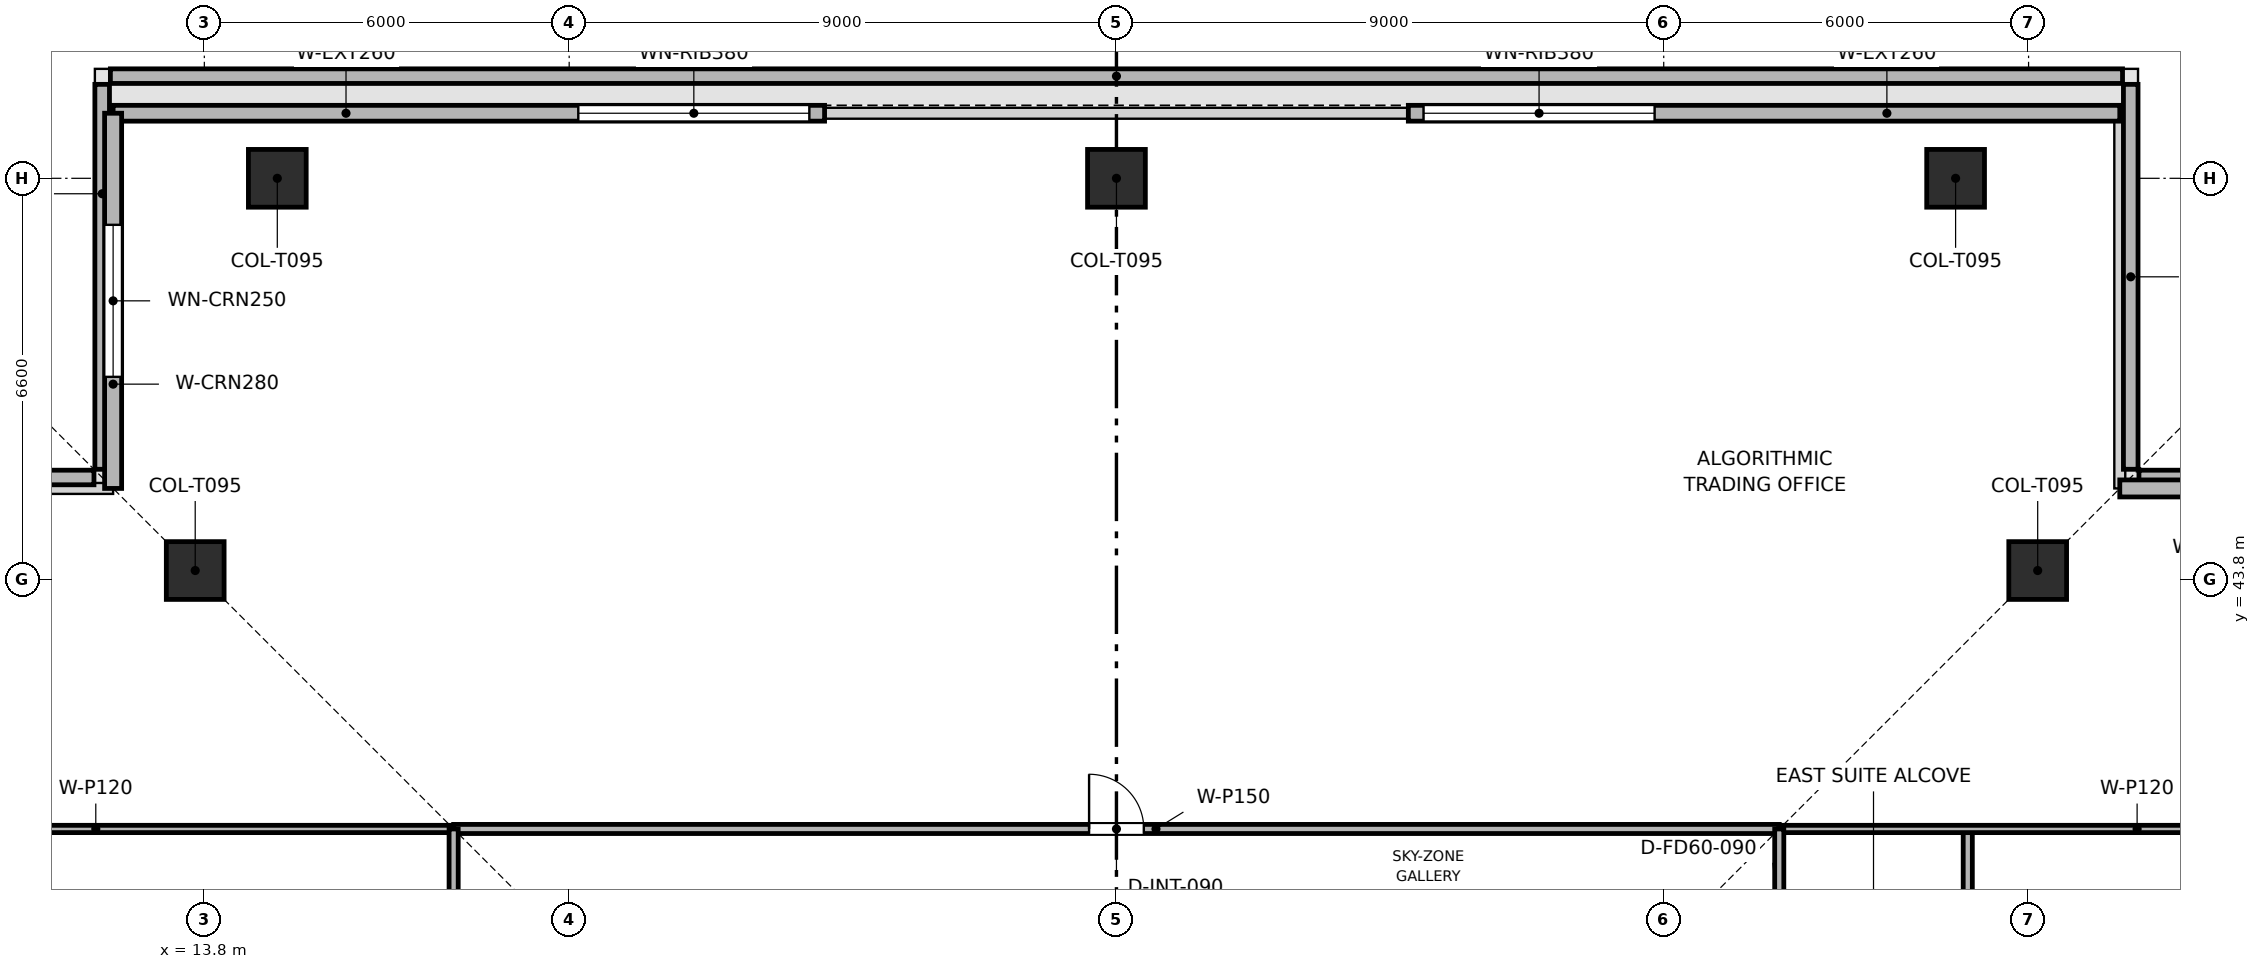
"""IFC4 building model, lengths in metres.
Left out: names, types, materials, properties, quantities, classifications, styles, units other than length and angle.
Written with IfcOpenShell. Run it as: python <this file> out.ifc"""

import sys

from ifc_helpers import new_model, si_unit, direction, frame, frame_2d, origin, origin_2d, place, context, subcontext, project, spatial, rectangle, extrude, element, fill, save


model = new_model("IFC4")
c1 = context("Model", 3, precision=1e-05, world=origin(), true_north=direction((0.0, 1.0)))
c2 = subcontext(c1, "Body", "Model", "MODEL_VIEW")
j1 = project(units=[si_unit("LENGTHUNIT", "METRE"), si_unit("PLANEANGLEUNIT", "RADIAN")], contexts=[c1])
p1 = place(None, origin())
s1 = spatial("IfcSite", under=j1, at=p1, CompositionType="ELEMENT")
p2 = place(p1, origin())
s2 = spatial("IfcBuilding", under=s1, at=p2, CompositionType="ELEMENT")
p3 = place(p2, frame((0.0, 0.0, 295.5)))
s3 = spatial("IfcBuildingStorey", under=s2, at=p3, CompositionType="ELEMENT", Elevation=295.5)
for number, where, z_axis, x_axis in (
    (1, (42.6, 50.4, 0.003), (0.0, 0.0, 1.0), (1.0, 0.0, 0.0)),
    (2, (28.8, 50.4, 0.003), (0.0, 0.0, 1.0), (1.0, 0.0, 0.0)),
    (3, (15.0, 50.4, 0.003), (0.0, 0.0, 1.0), (1.0, 0.0, 0.0)),
    (4, (43.95, 43.95, 0.003), (0.0, 0.0, 1.0), (1.0, 0.0, 0.0)),
    (5, (13.65, 43.95, 0.003), (0.0, 0.0, 1.0), (1.0, 0.0, 0.0)),
):
    element("IfcColumn", number, at=place(p3, frame(where, z_axis=z_axis, x_axis=x_axis)), inside=s3, PredefinedType="COLUMN", context=c2, shape_type="SweptSolid", body=[
        extrude(rectangle(XDim=0.95, YDim=0.95, at=origin_2d()), origin(), (0.0, 0.0, 1.0), 3.504),
    ])
for number, where, z_axis, x_axis in (
    (6, (51.945, 45.48, 0.0), (0.0, 0.0, 1.0), (-1.0, 0.0, 0.0)),
    (7, (45.48, 45.615, 0.0), (0.0, 0.0, 1.0), (0.0, 1.0, 0.0)),
):
    element("IfcWall", number, at=place(p3, frame(where, z_axis=z_axis, x_axis=x_axis)), inside=s3, PredefinedType="PARAPET", context=c2, shape_type="SweptSolid", body=[
        extrude(rectangle(XDim=6.33, YDim=0.24, at=frame_2d((3.165, 0.0))), origin(), (0.0, 0.0, 1.0), 1.2),
    ])
p4 = place(p3, frame((45.345, 52.08, 0.0), z_axis=(0.0, 0.0, 1.0), x_axis=(-1.0, 0.0, 0.0)))
e8 = element("IfcWall", 8, at=p4, inside=s3, PredefinedType="PARAPET", context=c2, shape_type="SweptSolid", body=[
    extrude(rectangle(XDim=33.09, YDim=0.24, at=frame_2d((16.545, 0.0))), origin(), (0.0, 0.0, 1.0), 1.2),
])
for number, where, z_axis, x_axis in (
    (9, (12.12, 51.945, 0.0), (0.0, 0.0, 1.0), (0.0, -1.0, 0.0)),
    (10, (11.985, 45.48, 0.0), (0.0, 0.0, 1.0), (-1.0, 0.0, 0.0)),
):
    element("IfcWall", number, at=place(p3, frame(where, z_axis=z_axis, x_axis=x_axis)), inside=s3, PredefinedType="PARAPET", context=c2, shape_type="SweptSolid", body=[
        extrude(rectangle(XDim=6.33, YDim=0.24, at=frame_2d((3.165, 0.0))), origin(), (0.0, 0.0, 1.0), 1.2),
    ])
p5 = place(p3, frame((12.3, 51.47, 0.0), z_axis=(0.0, 0.0, 1.0), x_axis=(1.0, 0.0, 0.0)))
e11 = element("IfcWall", 11, at=p5, inside=s3, PredefinedType="SOLIDWALL", context=c2, shape_type="SweptSolid", body=[
    extrude(rectangle(XDim=11.7, YDim=0.26, at=frame_2d((5.85, 0.0))), origin(), (0.0, 0.0, 1.0), 3.51),
])
p6 = place(p5, frame((7.65, 0.0, 0.9)))
e12 = element("IfcOpeningElement", 12, at=p6, cuts=e11, PredefinedType="OPENING", context=c2, shape_type="SweptSolid", body=[
    extrude(rectangle(XDim=3.8, YDim=1.9, at=frame_2d((1.9, 0.95))), frame((0.0, 0.14, 0.0), z_axis=(0.0, -1.0, 0.0), x_axis=(1.0, 0.0, 0.0)), (0.0, 0.0, 1.0), 0.28),
])
p7 = place(p3, frame((33.6, 51.47, 0.0), z_axis=(0.0, 0.0, 1.0), x_axis=(1.0, 0.0, 0.0)))
e13 = element("IfcWall", 13, at=p7, inside=s3, PredefinedType="SOLIDWALL", context=c2, shape_type="SweptSolid", body=[
    extrude(rectangle(XDim=11.7, YDim=0.26, at=frame_2d((5.85, 0.0))), origin(), (0.0, 0.0, 1.0), 3.51),
])
p8 = place(p7, frame((0.25, 0.0, 0.9)))
e14 = element("IfcOpeningElement", 14, at=p8, cuts=e13, PredefinedType="OPENING", context=c2, shape_type="SweptSolid", body=[
    extrude(rectangle(XDim=3.8, YDim=1.9, at=frame_2d((1.9, 0.95))), frame((0.0, 0.14, 0.0), z_axis=(0.0, -1.0, 0.0), x_axis=(1.0, 0.0, 0.0)), (0.0, 0.0, 1.0), 0.28),
])
p9 = place(p3, frame((12.3, 45.3, 0.0), z_axis=(0.0, 0.0, 1.0), x_axis=(0.0, 1.0, 0.0)))
e15 = element("IfcWall", 15, at=p9, inside=s3, PredefinedType="SOLIDWALL", context=c2, shape_type="SweptSolid", body=[
    extrude(rectangle(XDim=6.17, YDim=0.28, at=frame_2d((3.085, 0.0))), origin(), (0.0, 0.0, 1.0), 3.51),
])
p10 = place(p9, frame((1.835, 0.0, 0.9)))
e16 = element("IfcOpeningElement", 16, at=p10, cuts=e15, PredefinedType="OPENING", context=c2, shape_type="SweptSolid", body=[
    extrude(rectangle(XDim=2.5, YDim=1.9, at=frame_2d((1.25, 0.95))), frame((0.0, 0.15, 0.0), z_axis=(0.0, -1.0, 0.0), x_axis=(1.0, 0.0, 0.0)), (0.0, 0.0, 1.0), 0.3),
])
p11 = place(p3, frame((45.3, 45.3, 0.0), z_axis=(0.0, 0.0, 1.0), x_axis=(1.0, 0.0, 0.0)))
e17 = element("IfcWall", 17, at=p11, inside=s3, PredefinedType="SOLIDWALL", context=c2, shape_type="SweptSolid", body=[
    extrude(rectangle(XDim=6.17, YDim=0.28, at=frame_2d((3.085, 0.0))), origin(), (0.0, 0.0, 1.0), 3.51),
])
p12 = place(p11, frame((1.835, 0.0, 0.9)))
e18 = element("IfcOpeningElement", 18, at=p12, cuts=e17, PredefinedType="OPENING", context=c2, shape_type="SweptSolid", body=[
    extrude(rectangle(XDim=2.5, YDim=1.9, at=frame_2d((1.25, 0.95))), frame((0.0, 0.15, 0.0), z_axis=(0.0, -1.0, 0.0), x_axis=(1.0, 0.0, 0.0)), (0.0, 0.0, 1.0), 0.3),
])
p13 = place(p3, frame((42.8, 28.0, 0.0), z_axis=(0.0, 0.0, 1.0), x_axis=(0.0, 1.0, 0.0)))
e19 = element("IfcWall", 19, at=p13, inside=s3, PredefinedType="PARTITIONING", context=c2, shape_type="SweptSolid", body=[
    extrude(rectangle(XDim=11.7, YDim=0.15, at=frame_2d((5.85, 0.0))), origin(), (0.0, 0.0, 1.0), 3.095),
])
p14 = place(p13, frame((9.6, 0.0, 0.0)))
e20 = element("IfcOpeningElement", 20, at=p14, cuts=e19, PredefinedType="OPENING", context=c2, shape_type="SweptSolid", body=[
    extrude(rectangle(XDim=0.9, YDim=2.1, at=frame_2d((0.45, 1.05))), frame((0.0, 0.085, 0.0), z_axis=(0.0, -1.0, 0.0), x_axis=(1.0, 0.0, 0.0)), (0.0, 0.0, 1.0), 0.17),
])
for number, where, z_axis, x_axis in (
    (21, (6.13, 39.7, 0.0), (0.0, 0.0, 1.0), (1.0, 0.0, 0.0)),
    (22, (39.7, 39.7, 0.0), (0.0, 0.0, 1.0), (1.0, 0.0, 0.0)),
):
    element("IfcWall", number, at=place(p3, frame(where, z_axis=z_axis, x_axis=x_axis)), inside=s3, PredefinedType="PARTITIONING", context=c2, shape_type="SweptSolid", body=[
        extrude(rectangle(XDim=11.77, YDim=0.12, at=frame_2d((5.885, 0.0))), origin(), (0.0, 0.0, 1.0), 3.095),
    ])
p15 = place(p3, frame((17.9, 39.7, 0.0), z_axis=(0.0, 0.0, 1.0), x_axis=(1.0, 0.0, 0.0)))
e23 = element("IfcWall", 23, at=p15, inside=s3, PredefinedType="PARTITIONING", context=c2, shape_type="SweptSolid", body=[
    extrude(rectangle(XDim=21.8, YDim=0.15, at=frame_2d((10.9, 0.0))), origin(), (0.0, 0.0, 1.0), 3.095),
])
p16 = place(p15, frame((10.45, 0.0, 0.0)))
e24 = element("IfcOpeningElement", 24, at=p16, cuts=e23, PredefinedType="OPENING", context=c2, shape_type="SweptSolid", body=[
    extrude(rectangle(XDim=0.9, YDim=2.1, at=frame_2d((0.45, 1.05))), frame((0.0, 0.085, 0.0), z_axis=(0.0, -1.0, 0.0), x_axis=(1.0, 0.0, 0.0)), (0.0, 0.0, 1.0), 0.17),
])
p17 = place(p3, frame((17.9, 12.3, 0.0), z_axis=(0.0, 0.0, 1.0), x_axis=(0.0, 1.0, 0.0)))
e25 = element("IfcWall", 25, at=p17, inside=s3, PredefinedType="PARTITIONING", context=c2, shape_type="SweptSolid", body=[
    extrude(rectangle(XDim=27.4, YDim=0.15, at=frame_2d((13.7, 0.0))), origin(), (0.0, 0.0, 1.0), 3.095),
])
p18 = place(p17, frame((1.498, 0.0, 0.0)))
e26 = element("IfcOpeningElement", 26, at=p18, cuts=e25, PredefinedType="OPENING", context=c2, shape_type="SweptSolid", body=[
    extrude(rectangle(XDim=0.9, YDim=2.1, at=frame_2d((0.45, 1.05))), frame((0.0, 0.085, 0.0), z_axis=(0.0, -1.0, 0.0), x_axis=(1.0, 0.0, 0.0)), (0.0, 0.0, 1.0), 0.17),
])
p19 = place(p17, frame((15.198, 0.0, 0.0)))
e27 = element("IfcOpeningElement", 27, at=p19, cuts=e25, PredefinedType="OPENING", context=c2, shape_type="SweptSolid", body=[
    extrude(rectangle(XDim=0.9, YDim=2.1, at=frame_2d((0.45, 1.05))), frame((0.0, 0.085, 0.0), z_axis=(0.0, -1.0, 0.0), x_axis=(1.0, 0.0, 0.0)), (0.0, 0.0, 1.0), 0.17),
])
p20 = place(p3, frame((39.7, 24.4, 0.0), z_axis=(0.0, 0.0, 1.0), x_axis=(0.0, 1.0, 0.0)))
e28 = element("IfcWall", 28, at=p20, inside=s3, PredefinedType="PARTITIONING", context=c2, shape_type="SweptSolid", body=[
    extrude(rectangle(XDim=15.3, YDim=0.15, at=frame_2d((7.65, 0.0))), origin(), (0.0, 0.0, 1.0), 3.095),
])
p21 = place(p20, frame((1.35, 0.0, 0.0)))
e29 = element("IfcOpeningElement", 29, at=p21, cuts=e28, PredefinedType="OPENING", context=c2, shape_type="SweptSolid", body=[
    extrude(rectangle(XDim=0.9, YDim=2.1, at=frame_2d((0.45, 1.05))), frame((0.0, 0.085, 0.0), z_axis=(0.0, -1.0, 0.0), x_axis=(1.0, 0.0, 0.0)), (0.0, 0.0, 1.0), 0.17),
])
p22 = place(p20, frame((4.55, 0.0, 0.0)))
e30 = element("IfcOpeningElement", 30, at=p22, cuts=e28, PredefinedType="OPENING", context=c2, shape_type="SweptSolid", body=[
    extrude(rectangle(XDim=0.9, YDim=2.1, at=frame_2d((0.45, 1.05))), frame((0.0, 0.085, 0.0), z_axis=(0.0, -1.0, 0.0), x_axis=(1.0, 0.0, 0.0)), (0.0, 0.0, 1.0), 0.17),
])
p23 = place(p20, frame((7.45, 0.0, 0.0)))
e31 = element("IfcOpeningElement", 31, at=p23, cuts=e28, PredefinedType="OPENING", context=c2, shape_type="SweptSolid", body=[
    extrude(rectangle(XDim=0.9, YDim=2.1, at=frame_2d((0.45, 1.05))), frame((0.0, 0.085, 0.0), z_axis=(0.0, -1.0, 0.0), x_axis=(1.0, 0.0, 0.0)), (0.0, 0.0, 1.0), 0.17),
])
p24 = place(p20, frame((10.2, 0.0, 0.0)))
e32 = element("IfcOpeningElement", 32, at=p24, cuts=e28, PredefinedType="OPENING", context=c2, shape_type="SweptSolid", body=[
    extrude(rectangle(XDim=0.95, YDim=2.1, at=frame_2d((0.475, 1.05))), frame((0.0, 0.085, 0.0), z_axis=(0.0, -1.0, 0.0), x_axis=(1.0, 0.0, 0.0)), (0.0, 0.0, 1.0), 0.17),
])
p25 = place(p20, frame((13.2, 0.0, 0.0)))
e33 = element("IfcOpeningElement", 33, at=p25, cuts=e28, PredefinedType="OPENING", context=c2, shape_type="SweptSolid", body=[
    extrude(rectangle(XDim=0.9, YDim=2.1, at=frame_2d((0.45, 1.05))), frame((0.0, 0.085, 0.0), z_axis=(0.0, -1.0, 0.0), x_axis=(1.0, 0.0, 0.0)), (0.0, 0.0, 1.0), 0.17),
])
p26 = place(p6, origin())
e34 = element("IfcWindow", 34, at=p26, inside=s3, PartitioningType="SINGLE_PANEL", PredefinedType="WINDOW", context=c2, shape_type="SweptSolid", body=[
    extrude(rectangle(XDim=3.8, YDim=1.9, at=frame_2d((1.9, 0.95))), frame((0.0, 0.03, 0.0), z_axis=(0.0, -1.0, 0.0), x_axis=(1.0, 0.0, 0.0)), (0.0, 0.0, 1.0), 0.06),
])
fill(e12, e34)
p27 = place(p8, origin())
e35 = element("IfcWindow", 35, at=p27, inside=s3, PartitioningType="SINGLE_PANEL", PredefinedType="WINDOW", context=c2, shape_type="SweptSolid", body=[
    extrude(rectangle(XDim=3.8, YDim=1.9, at=frame_2d((1.9, 0.95))), frame((0.0, 0.03, 0.0), z_axis=(0.0, -1.0, 0.0), x_axis=(1.0, 0.0, 0.0)), (0.0, 0.0, 1.0), 0.06),
])
fill(e14, e35)
p28 = place(p10, origin())
e36 = element("IfcWindow", 36, at=p28, inside=s3, PartitioningType="SINGLE_PANEL", PredefinedType="WINDOW", context=c2, shape_type="SweptSolid", body=[
    extrude(rectangle(XDim=2.5, YDim=1.9, at=frame_2d((1.25, 0.95))), frame((0.0, 0.03, 0.0), z_axis=(0.0, -1.0, 0.0), x_axis=(1.0, 0.0, 0.0)), (0.0, 0.0, 1.0), 0.06),
])
fill(e16, e36)
p29 = place(p16, origin())
e37 = element("IfcDoor", 37, at=p29, inside=s3, OperationType="SINGLE_SWING_LEFT", PredefinedType="DOOR", context=c2, shape_type="SweptSolid", body=[
    extrude(rectangle(XDim=0.9, YDim=2.1, at=frame_2d((0.45, 1.05))), frame((0.0, 0.025, 0.0), z_axis=(0.0, -1.0, 0.0), x_axis=(1.0, 0.0, 0.0)), (0.0, 0.0, 1.0), 0.05),
])
fill(e24, e37)
save(model, sys.argv[1])
